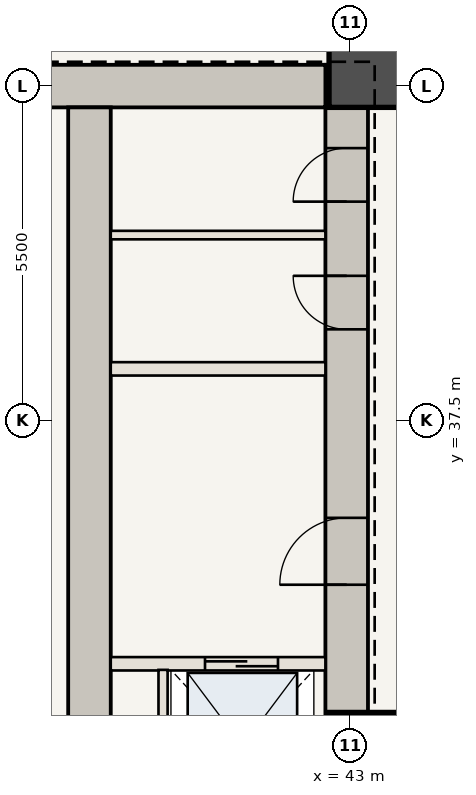
"""IFC4 building model, lengths in metres.
Left out: names, types, materials, properties, quantities, classifications, styles, units other than length and angle.
Written with IfcOpenShell. Run it as: python <this file> out.ifc"""

import sys

from ifc_helpers import new_model, si_unit, direction, frame, frame_2d, origin, origin_2d, place, context, subcontext, project, spatial, rectangle, extrude, element, fill, save


model = new_model("IFC4")
c1 = context("Model", 3, precision=1e-05, world=origin(), true_north=direction((0.0, 1.0)))
c2 = subcontext(c1, "Body", "Model", "MODEL_VIEW")
j1 = project(units=[si_unit("LENGTHUNIT", "METRE"), si_unit("PLANEANGLEUNIT", "RADIAN")], contexts=[c1])
p1 = place(None, origin())
s1 = spatial("IfcSite", under=j1, at=p1, CompositionType="ELEMENT")
p2 = place(p1, origin())
s2 = spatial("IfcBuilding", under=s1, at=p2, CompositionType="ELEMENT")
p3 = place(p2, frame((0.0, 0.0, 6.65)))
s3 = spatial("IfcBuildingStorey", under=s2, at=p3, CompositionType="ELEMENT", Elevation=6.65)
p4 = place(p3, frame((42.94, 30.6, 0.0), z_axis=(0.0, 0.0, 1.0), x_axis=(0.0, 1.0, 0.0)))
e1 = element("IfcWall", 1, at=p4, inside=s3, PredefinedType="SHEAR", context=c2, shape_type="SweptSolid", body=[
    extrude(rectangle(XDim=12.75, YDim=0.7, at=frame_2d((6.375, 0.0))), origin(), (0.0, 0.0, 1.0), 5.6),
])
p5 = place(p4, frame((4.2, 0.0, 0.0)))
e2 = element("IfcOpeningElement", 2, at=p5, cuts=e1, PredefinedType="OPENING", context=c2, shape_type="SweptSolid", body=[
    extrude(rectangle(XDim=1.1, YDim=2.15, at=frame_2d((0.55, 1.075))), frame((0.0, 0.36, 0.0), z_axis=(0.0, -1.0, 0.0), x_axis=(1.0, 0.0, 0.0)), (0.0, 0.0, 1.0), 0.72),
])
p6 = place(p4, frame((8.4, 0.0, 0.0)))
e3 = element("IfcOpeningElement", 3, at=p6, cuts=e1, PredefinedType="OPENING", context=c2, shape_type="SweptSolid", body=[
    extrude(rectangle(XDim=0.88, YDim=2.1, at=frame_2d((0.44, 1.05))), frame((0.0, 0.36, 0.0), z_axis=(0.0, -1.0, 0.0), x_axis=(1.0, 0.0, 0.0)), (0.0, 0.0, 1.0), 0.72),
])
p7 = place(p4, frame((10.5, 0.0, 0.0)))
e4 = element("IfcOpeningElement", 4, at=p7, cuts=e1, PredefinedType="OPENING", context=c2, shape_type="SweptSolid", body=[
    extrude(rectangle(XDim=0.88, YDim=2.1, at=frame_2d((0.44, 1.05))), frame((0.0, 0.36, 0.0), z_axis=(0.0, -1.0, 0.0), x_axis=(1.0, 0.0, 0.0)), (0.0, 0.0, 1.0), 0.72),
])
p8 = place(p3, frame((37.75, 43.0, 0.0), z_axis=(0.0, 0.0, 1.0), x_axis=(1.0, 0.0, 0.0)))
e5 = element("IfcWall", 5, at=p8, inside=s3, PredefinedType="SHEAR", context=c2, shape_type="SweptSolid", body=[
    extrude(rectangle(XDim=4.84, YDim=0.7, at=frame_2d((2.42, 0.0))), origin(), (0.0, 0.0, 1.0), 5.6),
])
p9 = place(p3, frame((38.71, 30.6, 0.0), z_axis=(0.0, 0.0, 1.0), x_axis=(0.0, 1.0, 0.0)))
e6 = element("IfcWall", 6, at=p9, inside=s3, PredefinedType="SHEAR", context=c2, shape_type="SweptSolid", body=[
    extrude(rectangle(XDim=12.05, YDim=0.7, at=frame_2d((6.025, 0.0))), origin(), (0.0, 0.0, 1.0), 5.6),
])
for number, where, z_axis, x_axis in (
    (7, (43.35, 32.0, 0.0), (0.0, 0.0, 1.0), (1.0, 0.0, 0.0)),
    (8, (43.35, 43.35, 0.0), (0.0, 0.0, 1.0), (1.0, 0.0, 0.0)),
):
    element("IfcColumn", number, at=place(p3, frame(where, z_axis=z_axis, x_axis=x_axis)), inside=s3, PredefinedType="COLUMN", context=c2, shape_type="SweptSolid", body=[
        extrude(rectangle(XDim=1.4, YDim=1.4, at=origin_2d()), origin(), (0.0, 0.0, 1.0), 5.6),
    ])
p10 = place(p3, frame((39.06, 33.5, 0.0), z_axis=(0.0, 0.0, 1.0), x_axis=(1.0, 0.0, 0.0)))
e9 = element("IfcWall", 9, at=p10, inside=s3, PredefinedType="STANDARD", context=c2, shape_type="SweptSolid", body=[
    extrude(rectangle(XDim=3.53, YDim=0.22, at=frame_2d((1.765, 0.0))), origin(), (0.0, 0.0, 1.0), 5.36),
])
p11 = place(p10, frame((1.55, 0.0, 0.0)))
e10 = element("IfcOpeningElement", 10, at=p11, cuts=e9, PredefinedType="OPENING", context=c2, shape_type="SweptSolid", body=[
    extrude(rectangle(XDim=1.2, YDim=2.2, at=frame_2d((0.6, 1.1))), frame((0.0, 0.12, 0.0), z_axis=(0.0, -1.0, 0.0), x_axis=(1.0, 0.0, 0.0)), (0.0, 0.0, 1.0), 0.24),
])
p12 = place(p3, frame((39.92, 30.75, 0.0), z_axis=(0.0, 0.0, 1.0), x_axis=(0.0, 1.0, 0.0)))
e11 = element("IfcWall", 11, at=p12, inside=s3, PredefinedType="STANDARD", context=c2, shape_type="SweptSolid", body=[
    extrude(rectangle(XDim=2.65, YDim=0.15, at=frame_2d((1.325, 0.0))), origin(), (0.0, 0.0, 1.0), 5.36),
])
p13 = place(p3, frame((39.06, 38.35, 0.0), z_axis=(0.0, 0.0, 1.0), x_axis=(1.0, 0.0, 0.0)))
e12 = element("IfcWall", 12, at=p13, inside=s3, PredefinedType="STANDARD", context=c2, shape_type="SweptSolid", body=[
    extrude(rectangle(XDim=3.53, YDim=0.22, at=frame_2d((1.765, 0.0))), origin(), (0.0, 0.0, 1.0), 5.36),
])
p14 = place(p3, frame((39.06, 40.55, 0.0), z_axis=(0.0, 0.0, 1.0), x_axis=(1.0, 0.0, 0.0)))
e13 = element("IfcWall", 13, at=p14, inside=s3, PredefinedType="STANDARD", context=c2, shape_type="SweptSolid", body=[
    extrude(rectangle(XDim=3.53, YDim=0.14, at=frame_2d((1.765, 0.0))), origin(), (0.0, 0.0, 1.0), 5.36),
])
p15 = place(p5, origin())
e14 = element("IfcDoor", 14, at=p15, inside=s3, OperationType="SINGLE_SWING_LEFT", PredefinedType="DOOR", context=c2, shape_type="SweptSolid", body=[
    extrude(rectangle(XDim=1.1, YDim=2.15, at=frame_2d((0.55, 1.075))), frame((0.0, 0.025, 0.0), z_axis=(0.0, -1.0, 0.0), x_axis=(1.0, 0.0, 0.0)), (0.0, 0.0, 1.0), 0.05),
])
fill(e2, e14)
p16 = place(p6, origin())
e15 = element("IfcDoor", 15, at=p16, inside=s3, OperationType="SINGLE_SWING_RIGHT", PredefinedType="DOOR", context=c2, shape_type="SweptSolid", body=[
    extrude(rectangle(XDim=0.88, YDim=2.1, at=frame_2d((0.44, 1.05))), frame((0.0, 0.025, 0.0), z_axis=(0.0, -1.0, 0.0), x_axis=(1.0, 0.0, 0.0)), (0.0, 0.0, 1.0), 0.05),
])
fill(e3, e15)
p17 = place(p7, origin())
e16 = element("IfcDoor", 16, at=p17, inside=s3, OperationType="SINGLE_SWING_LEFT", PredefinedType="DOOR", context=c2, shape_type="SweptSolid", body=[
    extrude(rectangle(XDim=0.88, YDim=2.1, at=frame_2d((0.44, 1.05))), frame((0.0, 0.025, 0.0), z_axis=(0.0, -1.0, 0.0), x_axis=(1.0, 0.0, 0.0)), (0.0, 0.0, 1.0), 0.05),
])
fill(e4, e16)
p18 = place(p11, origin())
e17 = element("IfcDoor", 17, at=p18, inside=s3, OperationType="DOUBLE_DOOR_SLIDING", PredefinedType="DOOR", context=c2, shape_type="SweptSolid", body=[
    extrude(rectangle(XDim=1.2, YDim=2.2, at=frame_2d((0.6, 1.1))), frame((0.0, 0.025, 0.0), z_axis=(0.0, -1.0, 0.0), x_axis=(1.0, 0.0, 0.0)), (0.0, 0.0, 1.0), 0.05),
])
fill(e10, e17)
save(model, sys.argv[1])
